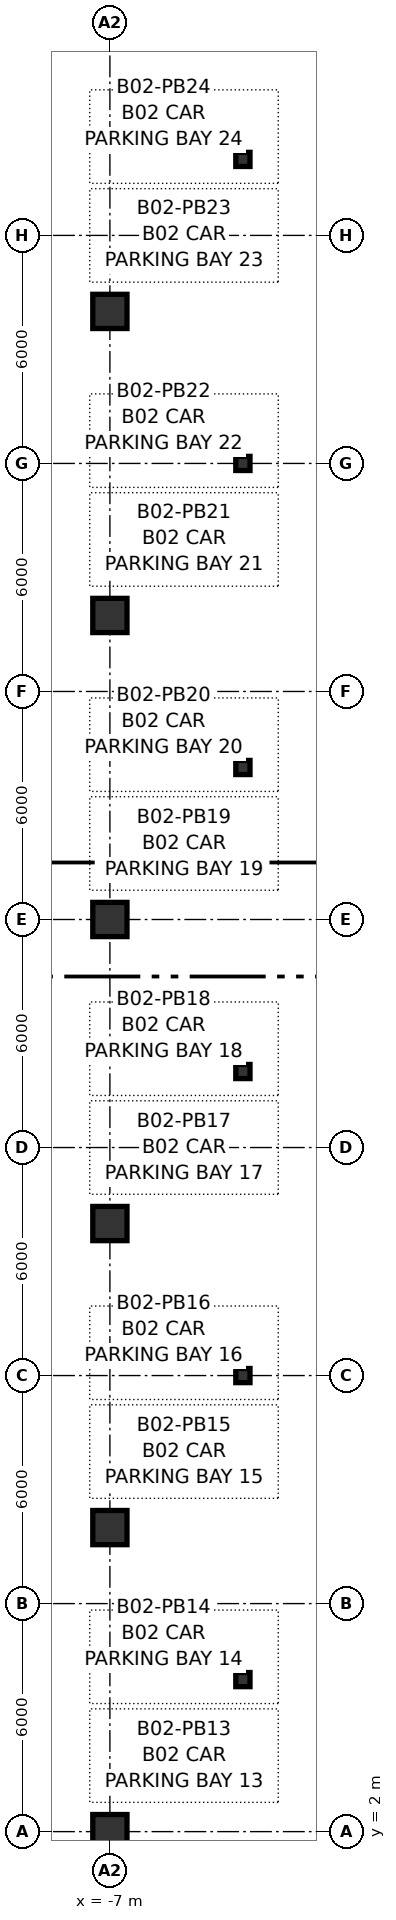
"""IFC4 building model, lengths in metres.
Left out: names, types, materials, properties, quantities, classifications, styles, units other than length and angle.
Written with IfcOpenShell. Run it as: python <this file> out.ifc"""

import sys

from ifc_helpers import new_model, si_unit, direction, frame, origin, origin_2d, place, context, subcontext, project, spatial, rectangle, i_section, extrude, source, transform, mapped, element, save


model = new_model("IFC4")
c1 = context("Model", 3, precision=1e-05, world=origin(), true_north=direction((0.0, 1.0)))
c2 = subcontext(c1, "Body", "Model", "MODEL_VIEW")
j1 = project(units=[si_unit("LENGTHUNIT", "METRE"), si_unit("PLANEANGLEUNIT", "RADIAN")], contexts=[c1])
p1 = place(None, origin())
s1 = spatial("IfcSite", under=j1, at=p1, CompositionType="ELEMENT")
p2 = place(p1, origin())
s2 = spatial("IfcBuilding", under=s1, at=p2, CompositionType="ELEMENT")
p3 = place(p2, frame((0.0, 0.0, -8.7)))
s3 = spatial("IfcBuildingStorey", under=s2, at=p3, CompositionType="ELEMENT", Elevation=-8.7)
m1 = source(origin(), c2, "Body", "SweptSolid", [
    extrude(i_section(OverallWidth=0.374, OverallDepth=0.372, WebThickness=0.016, FlangeThickness=0.026, FilletRadius=0.015, at=origin_2d()), origin(), (0.0, 0.0, 1.0), 4.2),
])
for number, where, z_axis, x_axis in (
    (1, (-3.5, 6.0, 0.0), (0.0, 0.0, 1.0), (1.0, 0.0, 0.0)),
    (2, (-3.5, 14.0, 0.0), (0.0, 0.0, 1.0), (1.0, 0.0, 0.0)),
    (3, (-3.5, 22.0, 0.0), (0.0, 0.0, 1.0), (1.0, 0.0, 0.0)),
    (4, (-3.5, 30.0, 0.0), (0.0, 0.0, 1.0), (1.0, 0.0, 0.0)),
    (5, (-3.5, 38.0, 0.0), (0.0, 0.0, 1.0), (1.0, 0.0, 0.0)),
    (6, (-3.5, 46.0, 0.0), (0.0, 0.0, 1.0), (1.0, 0.0, 0.0)),
):
    element("IfcColumn", number, at=place(p3, frame(where, z_axis=z_axis, x_axis=x_axis)), inside=s3, PredefinedType="PILASTER", context=c2, shape_type="MappedRepresentation", body=[
        mapped(m1, transform((0.0, 0.0, 0.0), x_axis=(1.0, 0.0, 0.0), y_axis=(0.0, 1.0, 0.0), z_axis=(0.0, 0.0, 1.0), scale=1.0)),
    ])
m2 = source(origin(), c2, "Body", "SweptSolid", [
    extrude(rectangle(XDim=0.9, YDim=0.9, at=origin_2d()), origin(), (0.0, 0.0, 1.0), 4.2),
])
for number, where, z_axis, x_axis in (
    (7, (-7.0, 2.0, 0.0), (0.0, 0.0, 1.0), (1.0, 0.0, 0.0)),
    (8, (-7.0, 10.0, 0.0), (0.0, 0.0, 1.0), (1.0, 0.0, 0.0)),
    (9, (-7.0, 18.0, 0.0), (0.0, 0.0, 1.0), (1.0, 0.0, 0.0)),
    (10, (-7.0, 26.0, 0.0), (0.0, 0.0, 1.0), (1.0, 0.0, 0.0)),
    (11, (-7.0, 34.0, 0.0), (0.0, 0.0, 1.0), (1.0, 0.0, 0.0)),
    (12, (-7.0, 42.0, 0.0), (0.0, 0.0, 1.0), (1.0, 0.0, 0.0)),
):
    element("IfcColumn", number, at=place(p3, frame(where, z_axis=z_axis, x_axis=x_axis)), inside=s3, PredefinedType="COLUMN", context=c2, shape_type="MappedRepresentation", body=[
        mapped(m2, transform((0.0, 0.0, 0.0), x_axis=(1.0, 0.0, 0.0), y_axis=(0.0, 1.0, 0.0), z_axis=(0.0, 0.0, 1.0), scale=1.0)),
    ])
save(model, sys.argv[1])
